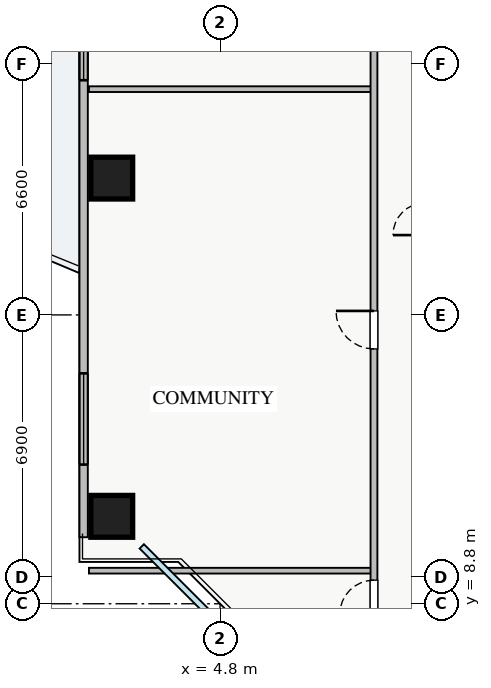
"""IFC4 building model, lengths in metres.
Left out: names, types, materials, properties, quantities, classifications, styles, units other than length and angle.
Written with IfcOpenShell. Run it as: python <this file> out.ifc"""

import sys

from ifc_helpers import new_model, si_unit, direction, frame, frame_2d, origin, origin_2d, place, context, subcontext, project, spatial, rectangle, extrude, source, transform, mapped, element, fill, save


model = new_model("IFC4")
c1 = context("Model", 3, precision=1e-05, world=origin(), true_north=direction((0.0, 1.0)))
c2 = subcontext(c1, "Body", "Model", "MODEL_VIEW")
j1 = project(units=[si_unit("LENGTHUNIT", "METRE"), si_unit("PLANEANGLEUNIT", "RADIAN")], contexts=[c1])
p1 = place(None, origin())
s1 = spatial("IfcSite", under=j1, at=p1, CompositionType="ELEMENT")
p2 = place(p1, origin())
s2 = spatial("IfcBuilding", under=s1, at=p2, CompositionType="ELEMENT")
p3 = place(p2, frame((0.0, 0.0, 113.25)))
s3 = spatial("IfcBuildingStorey", under=s2, at=p3, CompositionType="ELEMENT", Elevation=113.25)
m1 = source(origin(), c2, "Body", "SweptSolid", [
    extrude(rectangle(XDim=1.1, YDim=1.1, at=origin_2d()), origin(), (0.0, 0.0, 1.0), 3.25),
])
for number, where, z_axis, x_axis in (
    (1, (1.95, 20.0, 0.0), (0.0, 0.0, 1.0), (1.0, 0.0, 0.0)),
    (2, (1.95, 11.1, 0.0), (0.0, 0.0, 1.0), (1.0, 0.0, 0.0)),
):
    element("IfcColumn", number, at=place(p3, frame(where, z_axis=z_axis, x_axis=x_axis)), inside=s3, PredefinedType="COLUMN", context=c2, shape_type="MappedRepresentation", body=[
        mapped(m1, transform((0.0, 0.0, 0.0), x_axis=(1.0, 0.0, 0.0), y_axis=(0.0, 1.0, 0.0), z_axis=(0.0, 0.0, 1.0), scale=1.0)),
    ])
p4 = place(p3, frame((1.21, 10.55, 0.0), z_axis=(0.0, 0.0, 1.0), x_axis=(0.0, 1.0, 0.0)))
e3 = element("IfcWall", 3, at=p4, inside=s3, PredefinedType="STANDARD", context=c2, shape_type="SweptSolid", body=[
    extrude(rectangle(XDim=24.9, YDim=0.22, at=frame_2d((12.45, 0.0))), origin(), (0.0, 0.0, 1.0), 2.61),
])
p5 = place(p4, frame((13.3, 0.0, 0.0)))
e4 = element("IfcOpeningElement", 4, at=p5, cuts=e3, PredefinedType="OPENING", context=c2, shape_type="SweptSolid", body=[
    extrude(rectangle(XDim=1.2, YDim=2.1, at=frame_2d((0.6, 1.05))), frame((0.0, 0.12, 0.0), z_axis=(0.0, -1.0, 0.0), x_axis=(1.0, 0.0, 0.0)), (0.0, 0.0, 1.0), 0.24),
])
p6 = place(p4, frame((1.912, 0.0, 0.9)))
e5 = element("IfcOpeningElement", 5, at=p6, cuts=e3, PredefinedType="OPENING", context=c2, shape_type="SweptSolid", body=[
    extrude(rectangle(XDim=2.4, YDim=1.48, at=frame_2d((1.2, 0.74))), frame((0.0, 0.12, 0.0), z_axis=(0.0, -1.0, 0.0), x_axis=(1.0, 0.0, 0.0)), (0.0, 0.0, 1.0), 0.24),
])
p7 = place(p4, frame((20.737, 0.0, 0.9)))
e6 = element("IfcOpeningElement", 6, at=p7, cuts=e3, PredefinedType="OPENING", context=c2, shape_type="SweptSolid", body=[
    extrude(rectangle(XDim=2.1, YDim=1.48, at=frame_2d((1.05, 0.74))), frame((0.0, 0.12, 0.0), z_axis=(0.0, -1.0, 0.0), x_axis=(1.0, 0.0, 0.0)), (0.0, 0.0, 1.0), 0.24),
])
p8 = place(p4, frame((12.025, 0.0, 0.9)))
e7 = element("IfcOpeningElement", 7, at=p8, cuts=e3, PredefinedType="OPENING", context=c2, shape_type="SweptSolid", body=[
    extrude(rectangle(XDim=0.9, YDim=1.2, at=frame_2d((0.45, 0.6))), frame((0.0, 0.12, 0.0), z_axis=(0.0, -1.0, 0.0), x_axis=(1.0, 0.0, 0.0)), (0.0, 0.0, 1.0), 0.24),
])
for number, where, z_axis, x_axis in (
    (8, (1.35, 9.67, 0.0), (0.0, 0.0, 1.0), (1.0, 0.0, 0.0)),
    (9, (1.35, 22.34, 0.0), (0.0, 0.0, 1.0), (1.0, 0.0, 0.0)),
):
    element("IfcWall", number, at=place(p3, frame(where, z_axis=z_axis, x_axis=x_axis)), inside=s3, PredefinedType="PARTITIONING", context=c2, shape_type="SweptSolid", body=[
        extrude(rectangle(XDim=7.5, YDim=0.15, at=frame_2d((3.75, 0.0))), origin(), (0.0, 0.0, 1.0), 3.07),
    ])
p9 = place(p3, frame((8.85, 8.25, 0.0), z_axis=(0.0, 0.0, 1.0), x_axis=(0.0, 1.0, 0.0)))
e10 = element("IfcWall", 10, at=p9, inside=s3, PredefinedType="PARTITIONING", context=c2, shape_type="SweptSolid", body=[
    extrude(rectangle(XDim=29.5, YDim=0.18, at=frame_2d((14.75, 0.0))), origin(), (0.0, 0.0, 1.0), 3.07),
])
p10 = place(p9, frame((28.155, 0.0, 0.0)))
e11 = element("IfcOpeningElement", 11, at=p10, cuts=e10, PredefinedType="OPENING", context=c2, shape_type="SweptSolid", body=[
    extrude(rectangle(XDim=0.9, YDim=2.05, at=frame_2d((0.45, 1.025))), frame((0.0, 0.1, 0.0), z_axis=(0.0, -1.0, 0.0), x_axis=(1.0, 0.0, 0.0)), (0.0, 0.0, 1.0), 0.2),
])
p11 = place(p9, frame((0.27, 0.0, 0.0)))
e12 = element("IfcOpeningElement", 12, at=p11, cuts=e10, PredefinedType="OPENING", context=c2, shape_type="SweptSolid", body=[
    extrude(rectangle(XDim=0.9, YDim=2.05, at=frame_2d((0.45, 1.025))), frame((0.0, 0.1, 0.0), z_axis=(0.0, -1.0, 0.0), x_axis=(1.0, 0.0, 0.0)), (0.0, 0.0, 1.0), 0.2),
])
p12 = place(p9, frame((7.255, 0.0, 0.0)))
e13 = element("IfcOpeningElement", 13, at=p12, cuts=e10, PredefinedType="OPENING", context=c2, shape_type="SweptSolid", body=[
    extrude(rectangle(XDim=1.0, YDim=2.05, at=frame_2d((0.5, 1.025))), frame((0.0, 0.1, 0.0), z_axis=(0.0, -1.0, 0.0), x_axis=(1.0, 0.0, 0.0)), (0.0, 0.0, 1.0), 0.2),
])
p13 = place(p9, frame((16.675, 0.0, 0.0)))
e14 = element("IfcOpeningElement", 14, at=p13, cuts=e10, PredefinedType="OPENING", context=c2, shape_type="SweptSolid", body=[
    extrude(rectangle(XDim=1.0, YDim=2.05, at=frame_2d((0.5, 1.025))), frame((0.0, 0.1, 0.0), z_axis=(0.0, -1.0, 0.0), x_axis=(1.0, 0.0, 0.0)), (0.0, 0.0, 1.0), 0.2),
])
m2 = source(origin(), c2, "Body", "SweptSolid", [
    extrude(rectangle(XDim=2.4, YDim=1.48, at=frame_2d((1.2, 0.74))), frame((0.0, 0.03, 0.0), z_axis=(0.0, -1.0, 0.0), x_axis=(1.0, 0.0, 0.0)), (0.0, 0.0, 1.0), 0.06),
])
p14 = place(p6, origin())
e15 = element("IfcWindow", 15, at=p14, inside=s3, PartitioningType="TRIPLE_PANEL_VERTICAL", PredefinedType="WINDOW", context=c2, shape_type="MappedRepresentation", body=[
    mapped(m2, transform((0.0, 0.0, 0.0), x_axis=(1.0, 0.0, 0.0), y_axis=(0.0, 1.0, 0.0), z_axis=(0.0, 0.0, 1.0), scale=1.0)),
])
fill(e5, e15)
m3 = source(origin(), c2, "Body", "SweptSolid", [
    extrude(rectangle(XDim=0.9, YDim=2.05, at=frame_2d((0.45, 1.025))), frame((0.0, 0.025, 0.0), z_axis=(0.0, -1.0, 0.0), x_axis=(1.0, 0.0, 0.0)), (0.0, 0.0, 1.0), 0.05),
])
p15 = place(p11, origin())
e16 = element("IfcDoor", 16, at=p15, inside=s3, OperationType="SINGLE_SWING_LEFT", PredefinedType="DOOR", context=c2, shape_type="MappedRepresentation", body=[
    mapped(m3, transform((0.0, 0.0, 0.0), x_axis=(1.0, 0.0, 0.0), y_axis=(0.0, 1.0, 0.0), z_axis=(0.0, 0.0, 1.0), scale=1.0)),
])
fill(e12, e16)
m4 = source(origin(), c2, "Body", "SweptSolid", [
    extrude(rectangle(XDim=1.0, YDim=2.05, at=frame_2d((0.5, 1.025))), frame((0.0, 0.025, 0.0), z_axis=(0.0, -1.0, 0.0), x_axis=(1.0, 0.0, 0.0)), (0.0, 0.0, 1.0), 0.05),
])
p16 = place(p12, origin())
e17 = element("IfcDoor", 17, at=p16, inside=s3, OperationType="SINGLE_SWING_RIGHT", PredefinedType="DOOR", context=c2, shape_type="MappedRepresentation", body=[
    mapped(m4, transform((0.0, 0.0, 0.0), x_axis=(1.0, 0.0, 0.0), y_axis=(0.0, 1.0, 0.0), z_axis=(0.0, 0.0, 1.0), scale=1.0)),
])
fill(e13, e17)
m5 = source(origin(), c2, "Body", "SweptSolid", [
    extrude(rectangle(XDim=0.9, YDim=1.2, at=frame_2d((0.45, 0.6))), frame((0.0, 0.03, 0.0), z_axis=(0.0, -1.0, 0.0), x_axis=(1.0, 0.0, 0.0)), (0.0, 0.0, 1.0), 0.06),
])
p17 = place(p8, origin())
e18 = element("IfcWindow", 18, at=p17, inside=s3, PartitioningType="SINGLE_PANEL", PredefinedType="WINDOW", context=c2, shape_type="MappedRepresentation", body=[
    mapped(m5, transform((0.0, 0.0, 0.0), x_axis=(1.0, 0.0, 0.0), y_axis=(0.0, 1.0, 0.0), z_axis=(0.0, 0.0, 1.0), scale=1.0)),
])
fill(e7, e18)
save(model, sys.argv[1])
